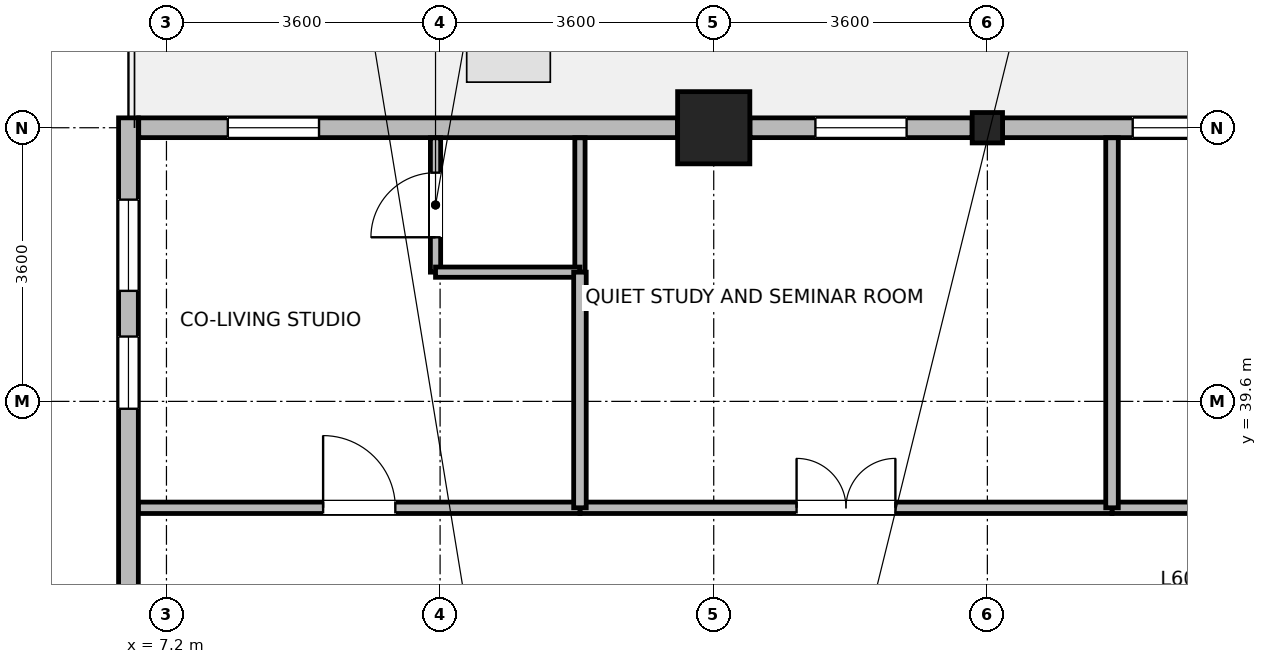
"""IFC4 building model, lengths in metres.
Left out: names, types, materials, properties, quantities, classifications, styles, units other than length and angle.
Written with IfcOpenShell. Run it as: python <this file> out.ifc"""

import sys

from ifc_helpers import new_model, si_unit, direction, frame, frame_2d, origin, origin_2d, place, context, subcontext, project, spatial, rectangle, i_section, extrude, source, transform, mapped, element, fill, save


model = new_model("IFC4")
c1 = context("Model", 3, precision=1e-05, world=origin(), true_north=direction((0.0, 1.0)))
c2 = subcontext(c1, "Body", "Model", "MODEL_VIEW")
j1 = project(units=[si_unit("LENGTHUNIT", "METRE"), si_unit("PLANEANGLEUNIT", "RADIAN")], contexts=[c1])
p1 = place(None, origin())
s1 = spatial("IfcSite", under=j1, at=p1, CompositionType="ELEMENT")
p2 = place(p1, origin())
s2 = spatial("IfcBuilding", under=s1, at=p2, CompositionType="ELEMENT")
p3 = place(p2, frame((0.0, 0.0, 235.1)))
s3 = spatial("IfcBuildingStorey", under=s2, at=p3, CompositionType="ELEMENT", Elevation=235.1)
m1 = source(origin(), c2, "Body", "SweptSolid", [
    extrude(rectangle(XDim=0.95, YDim=0.95, at=origin_2d()), origin(), (0.0, 0.0, 1.0), 3.7),
])
p4 = place(p3, frame((14.4, 43.2, 0.0), z_axis=(0.0, 0.0, 1.0), x_axis=(1.0, 0.0, 0.0)))
e1 = element("IfcColumn", 1, at=p4, inside=s3, PredefinedType="COLUMN", context=c2, shape_type="MappedRepresentation", body=[
    mapped(m1, transform((0.0, 0.0, 0.0), x_axis=(1.0, 0.0, 0.0), y_axis=(0.0, 1.0, 0.0), z_axis=(0.0, 0.0, 1.0), scale=1.0)),
])
m2 = source(origin(), c2, "Body", "SweptSolid", [
    extrude(i_section(OverallWidth=0.399, OverallDepth=0.4, WebThickness=0.017, FlangeThickness=0.023, FilletRadius=0.015, at=origin_2d()), origin(), (0.0, 0.0, 1.0), 3.7),
])
p5 = place(p3, frame((18.0, 43.2, 0.0), z_axis=(0.0, 0.0, 1.0), x_axis=(1.0, 0.0, 0.0)))
e2 = element("IfcColumn", 2, at=p5, inside=s3, PredefinedType="COLUMN", context=c2, shape_type="MappedRepresentation", body=[
    mapped(m2, transform((0.0, 0.0, 0.0), x_axis=(1.0, 0.0, 0.0), y_axis=(0.0, 1.0, 0.0), z_axis=(0.0, 0.0, 1.0), scale=1.0)),
])
p6 = place(p3, frame((18.2, 43.2, 0.0), z_axis=(0.0, 0.0, 1.0), x_axis=(1.0, 0.0, 0.0)))
e3 = element("IfcWall", 3, at=p6, inside=s3, PredefinedType="STANDARD", context=c2, shape_type="SweptSolid", body=[
    extrude(rectangle(XDim=2.924, YDim=0.26, at=frame_2d((1.462, 0.0))), origin(), (0.0, 0.0, 1.0), 3.02),
])
p7 = place(p6, frame((1.712, 0.0, 0.85)))
e4 = element("IfcOpeningElement", 4, at=p7, cuts=e3, PredefinedType="OPENING", context=c2, shape_type="SweptSolid", body=[
    extrude(rectangle(XDim=0.95, YDim=1.75, at=frame_2d((0.475, 0.875))), frame((0.0, 0.14, 0.0), z_axis=(0.0, -1.0, 0.0), x_axis=(1.0, 0.0, 0.0)), (0.0, 0.0, 1.0), 0.28),
])
p8 = place(p3, frame((14.876, 43.2, 0.0), z_axis=(0.0, 0.0, 1.0), x_axis=(1.0, 0.0, 0.0)))
e5 = element("IfcWall", 5, at=p8, inside=s3, PredefinedType="STANDARD", context=c2, shape_type="SweptSolid", body=[
    extrude(rectangle(XDim=2.924, YDim=0.26, at=frame_2d((1.462, 0.0))), origin(), (0.0, 0.0, 1.0), 3.02),
])
p9 = place(p8, frame((0.862, 0.0, 0.85)))
e6 = element("IfcOpeningElement", 6, at=p9, cuts=e5, PredefinedType="OPENING", context=c2, shape_type="SweptSolid", body=[
    extrude(rectangle(XDim=1.2, YDim=1.75, at=frame_2d((0.6, 0.875))), frame((0.0, 0.14, 0.0), z_axis=(0.0, -1.0, 0.0), x_axis=(1.0, 0.0, 0.0)), (0.0, 0.0, 1.0), 0.28),
])
p10 = place(p3, frame((6.835, 43.2, 0.0), z_axis=(0.0, 0.0, 1.0), x_axis=(1.0, 0.0, 0.0)))
e7 = element("IfcWall", 7, at=p10, inside=s3, PredefinedType="STANDARD", context=c2, shape_type="SweptSolid", body=[
    extrude(rectangle(XDim=7.089, YDim=0.26, at=frame_2d((3.544, 0.0))), origin(), (0.0, 0.0, 1.0), 3.42),
])
p11 = place(p10, frame((1.172, 0.0, 0.85)))
e8 = element("IfcOpeningElement", 8, at=p11, cuts=e7, PredefinedType="OPENING", context=c2, shape_type="SweptSolid", body=[
    extrude(rectangle(XDim=1.2, YDim=1.75, at=frame_2d((0.6, 0.875))), frame((0.0, 0.14, 0.0), z_axis=(0.0, -1.0, 0.0), x_axis=(1.0, 0.0, 0.0)), (0.0, 0.0, 1.0), 0.28),
])
p12 = place(p3, frame((6.7, 36.626, 0.0), z_axis=(0.0, 0.0, 1.0), x_axis=(0.0, 1.0, 0.0)))
e9 = element("IfcWall", 9, at=p12, inside=s3, PredefinedType="STANDARD", context=c2, shape_type="SweptSolid", body=[
    extrude(rectangle(XDim=6.704, YDim=0.26, at=frame_2d((3.352, 0.0))), origin(), (0.0, 0.0, 1.0), 3.42),
])
p13 = place(p12, frame((4.428, 0.0, 0.85)))
e10 = element("IfcOpeningElement", 10, at=p13, cuts=e9, PredefinedType="OPENING", context=c2, shape_type="SweptSolid", body=[
    extrude(rectangle(XDim=1.2, YDim=1.75, at=frame_2d((0.6, 0.875))), frame((0.0, 0.14, 0.0), z_axis=(0.0, -1.0, 0.0), x_axis=(1.0, 0.0, 0.0)), (0.0, 0.0, 1.0), 0.28),
])
p14 = place(p12, frame((2.877, 0.0, 0.85)))
e11 = element("IfcOpeningElement", 11, at=p14, cuts=e9, PredefinedType="OPENING", context=c2, shape_type="SweptSolid", body=[
    extrude(rectangle(XDim=0.95, YDim=1.75, at=frame_2d((0.475, 0.875))), frame((0.0, 0.14, 0.0), z_axis=(0.0, -1.0, 0.0), x_axis=(1.0, 0.0, 0.0)), (0.0, 0.0, 1.0), 0.28),
])
p15 = place(p3, frame((10.74, 41.3, 0.0), z_axis=(0.0, 0.0, 1.0), x_axis=(0.0, 1.0, 0.0)))
e12 = element("IfcWall", 12, at=p15, inside=s3, PredefinedType="PARTITIONING", context=c2, shape_type="SweptSolid", body=[
    extrude(rectangle(XDim=1.768, YDim=0.135, at=frame_2d((0.884, 0.0))), origin(), (0.0, 0.0, 1.0), 3.42),
])
p16 = place(p15, frame((0.459, 0.0, 0.0)))
e13 = element("IfcOpeningElement", 13, at=p16, cuts=e12, PredefinedType="OPENING", context=c2, shape_type="SweptSolid", body=[
    extrude(rectangle(XDim=0.85, YDim=2.04, at=frame_2d((0.425, 1.02))), frame((0.0, 0.078, 0.0), z_axis=(0.0, -1.0, 0.0), x_axis=(1.0, 0.0, 0.0)), (0.0, 0.0, 1.0), 0.155),
])
p17 = place(p3, frame((12.64, 41.3, 0.0), z_axis=(0.0, 0.0, 1.0), x_axis=(0.0, 1.0, 0.0)))
e14 = element("IfcWall", 14, at=p17, inside=s3, PredefinedType="PARTITIONING", context=c2, shape_type="SweptSolid", body=[
    extrude(rectangle(XDim=1.768, YDim=0.135, at=frame_2d((0.884, 0.0))), origin(), (0.0, 0.0, 1.0), 3.42),
])
p18 = place(p3, frame((10.74, 41.3, 0.0), z_axis=(0.0, 0.0, 1.0), x_axis=(1.0, 0.0, 0.0)))
e15 = element("IfcWall", 15, at=p18, inside=s3, PredefinedType="PARTITIONING", context=c2, shape_type="SweptSolid", body=[
    extrude(rectangle(XDim=1.9, YDim=0.135, at=frame_2d((0.95, 0.0))), origin(), (0.0, 0.0, 1.0), 3.42),
])
p19 = place(p3, frame((19.64, 38.2, 0.0), z_axis=(0.0, 0.0, 1.0), x_axis=(1.0, 0.0, 0.0)))
e16 = element("IfcWall", 16, at=p19, inside=s3, PredefinedType="PARTITIONING", context=c2, shape_type="SweptSolid", body=[
    extrude(rectangle(XDim=9.18, YDim=0.15, at=frame_2d((4.59, 0.0))), origin(), (0.0, 0.0, 1.0), 3.42),
])
p20 = place(p19, frame((3.94, 0.0, 0.0)))
e17 = element("IfcOpeningElement", 17, at=p20, cuts=e16, PredefinedType="OPENING", context=c2, shape_type="SweptSolid", body=[
    extrude(rectangle(XDim=1.3, YDim=2.12, at=frame_2d((0.65, 1.06))), frame((0.0, 0.085, 0.0), z_axis=(0.0, -1.0, 0.0), x_axis=(1.0, 0.0, 0.0)), (0.0, 0.0, 1.0), 0.17),
])
p21 = place(p3, frame((12.64, 38.2, 0.0), z_axis=(0.0, 0.0, 1.0), x_axis=(1.0, 0.0, 0.0)))
e18 = element("IfcWall", 18, at=p21, inside=s3, PredefinedType="PARTITIONING", context=c2, shape_type="SweptSolid", body=[
    extrude(rectangle(XDim=7.0, YDim=0.15, at=frame_2d((3.5, 0.0))), origin(), (0.0, 0.0, 1.0), 3.42),
])
p22 = place(p21, frame((2.85, 0.0, 0.0)))
e19 = element("IfcOpeningElement", 19, at=p22, cuts=e18, PredefinedType="OPENING", context=c2, shape_type="SweptSolid", body=[
    extrude(rectangle(XDim=1.3, YDim=2.12, at=frame_2d((0.65, 1.06))), frame((0.0, 0.085, 0.0), z_axis=(0.0, -1.0, 0.0), x_axis=(1.0, 0.0, 0.0)), (0.0, 0.0, 1.0), 0.17),
])
p23 = place(p3, frame((6.832, 38.2, 0.0), z_axis=(0.0, 0.0, 1.0), x_axis=(1.0, 0.0, 0.0)))
e20 = element("IfcWall", 20, at=p23, inside=s3, PredefinedType="PARTITIONING", context=c2, shape_type="SweptSolid", body=[
    extrude(rectangle(XDim=5.808, YDim=0.15, at=frame_2d((2.904, 0.0))), origin(), (0.0, 0.0, 1.0), 3.42),
])
p24 = place(p23, frame((2.429, 0.0, 0.0)))
e21 = element("IfcOpeningElement", 21, at=p24, cuts=e20, PredefinedType="OPENING", context=c2, shape_type="SweptSolid", body=[
    extrude(rectangle(XDim=0.95, YDim=2.1, at=frame_2d((0.475, 1.05))), frame((0.0, 0.085, 0.0), z_axis=(0.0, -1.0, 0.0), x_axis=(1.0, 0.0, 0.0)), (0.0, 0.0, 1.0), 0.17),
])
p25 = place(p3, frame((19.64, 38.2, 0.0), z_axis=(0.0, 0.0, 1.0), x_axis=(0.0, 1.0, 0.0)))
e22 = element("IfcWall", 22, at=p25, inside=s3, PredefinedType="PARTITIONING", context=c2, shape_type="SweptSolid", body=[
    extrude(rectangle(XDim=4.868, YDim=0.165, at=frame_2d((2.434, 0.0))), origin(), (0.0, 0.0, 1.0), 3.42),
])
p26 = place(p3, frame((12.64, 38.2, 0.0), z_axis=(0.0, 0.0, 1.0), x_axis=(0.0, 1.0, 0.0)))
e23 = element("IfcWall", 23, at=p26, inside=s3, PredefinedType="PARTITIONING", context=c2, shape_type="SweptSolid", body=[
    extrude(rectangle(XDim=3.1, YDim=0.165, at=frame_2d((1.55, 0.0))), origin(), (0.0, 0.0, 1.0), 3.42),
])
p27 = place(p7, origin())
e24 = element("IfcWindow", 24, at=p27, inside=s3, PartitioningType="SINGLE_PANEL", PredefinedType="WINDOW", context=c2, shape_type="SweptSolid", body=[
    extrude(rectangle(XDim=0.95, YDim=1.75, at=frame_2d((0.475, 0.875))), frame((0.0, 0.03, 0.0), z_axis=(0.0, -1.0, 0.0), x_axis=(1.0, 0.0, 0.0)), (0.0, 0.0, 1.0), 0.06),
])
fill(e4, e24)
p28 = place(p9, origin())
e25 = element("IfcWindow", 25, at=p28, inside=s3, PartitioningType="SINGLE_PANEL", PredefinedType="WINDOW", context=c2, shape_type="SweptSolid", body=[
    extrude(rectangle(XDim=1.2, YDim=1.75, at=frame_2d((0.6, 0.875))), frame((0.0, 0.03, 0.0), z_axis=(0.0, -1.0, 0.0), x_axis=(1.0, 0.0, 0.0)), (0.0, 0.0, 1.0), 0.06),
])
fill(e6, e25)
p29 = place(p11, origin())
e26 = element("IfcWindow", 26, at=p29, inside=s3, PartitioningType="SINGLE_PANEL", PredefinedType="WINDOW", context=c2, shape_type="SweptSolid", body=[
    extrude(rectangle(XDim=1.2, YDim=1.75, at=frame_2d((0.6, 0.875))), frame((0.0, 0.03, 0.0), z_axis=(0.0, -1.0, 0.0), x_axis=(1.0, 0.0, 0.0)), (0.0, 0.0, 1.0), 0.06),
])
fill(e8, e26)
p30 = place(p13, origin())
e27 = element("IfcWindow", 27, at=p30, inside=s3, PartitioningType="SINGLE_PANEL", PredefinedType="WINDOW", context=c2, shape_type="SweptSolid", body=[
    extrude(rectangle(XDim=1.2, YDim=1.75, at=frame_2d((0.6, 0.875))), frame((0.0, 0.03, 0.0), z_axis=(0.0, -1.0, 0.0), x_axis=(1.0, 0.0, 0.0)), (0.0, 0.0, 1.0), 0.06),
])
fill(e10, e27)
p31 = place(p14, origin())
e28 = element("IfcWindow", 28, at=p31, inside=s3, PartitioningType="SINGLE_PANEL", PredefinedType="WINDOW", context=c2, shape_type="SweptSolid", body=[
    extrude(rectangle(XDim=0.95, YDim=1.75, at=frame_2d((0.475, 0.875))), frame((0.0, 0.03, 0.0), z_axis=(0.0, -1.0, 0.0), x_axis=(1.0, 0.0, 0.0)), (0.0, 0.0, 1.0), 0.06),
])
fill(e11, e28)
p32 = place(p16, origin())
e29 = element("IfcDoor", 29, at=p32, inside=s3, OperationType="SINGLE_SWING_LEFT", PredefinedType="DOOR", context=c2, shape_type="SweptSolid", body=[
    extrude(rectangle(XDim=0.85, YDim=2.04, at=frame_2d((0.425, 1.02))), frame((0.0, 0.025, 0.0), z_axis=(0.0, -1.0, 0.0), x_axis=(1.0, 0.0, 0.0)), (0.0, 0.0, 1.0), 0.05),
])
fill(e13, e29)
p33 = place(p22, origin())
e30 = element("IfcDoor", 30, at=p33, inside=s3, OperationType="DOUBLE_DOOR_SINGLE_SWING", PredefinedType="DOOR", context=c2, shape_type="SweptSolid", body=[
    extrude(rectangle(XDim=1.3, YDim=2.12, at=frame_2d((0.65, 1.06))), frame((0.0, 0.025, 0.0), z_axis=(0.0, -1.0, 0.0), x_axis=(1.0, 0.0, 0.0)), (0.0, 0.0, 1.0), 0.05),
])
fill(e19, e30)
p34 = place(p24, origin())
e31 = element("IfcDoor", 31, at=p34, inside=s3, OperationType="SINGLE_SWING_LEFT", PredefinedType="DOOR", context=c2, shape_type="SweptSolid", body=[
    extrude(rectangle(XDim=0.95, YDim=2.1, at=frame_2d((0.475, 1.05))), frame((0.0, 0.025, 0.0), z_axis=(0.0, -1.0, 0.0), x_axis=(1.0, 0.0, 0.0)), (0.0, 0.0, 1.0), 0.05),
])
fill(e21, e31)
save(model, sys.argv[1])
